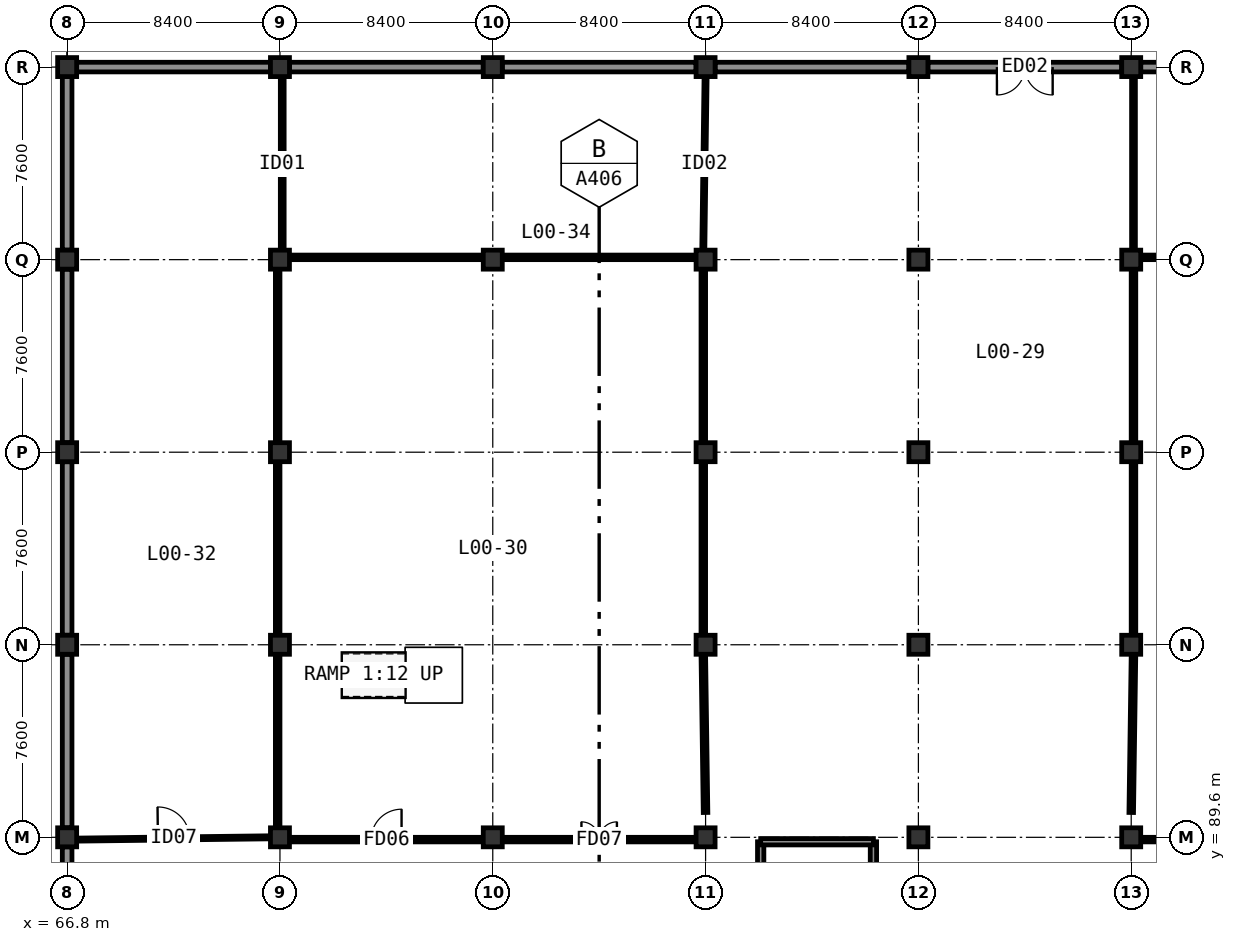
"""IFC4 building model, lengths in metres.
Left out: names, types, materials, properties, quantities, classifications, styles, units other than length and angle.
Written with IfcOpenShell. Run it as: python <this file> out.ifc"""

import sys

from ifc_helpers import new_model, si_unit, direction, frame, frame_2d, origin, origin_2d, place, context, subcontext, project, spatial, rectangle, extrude, element, fill, save


model = new_model("IFC4")
c1 = context("Model", 3, precision=1e-05, world=origin(), true_north=direction((0.0, 1.0)))
c2 = subcontext(c1, "Body", "Model", "MODEL_VIEW")
j1 = project(units=[si_unit("LENGTHUNIT", "METRE"), si_unit("PLANEANGLEUNIT", "RADIAN")], contexts=[c1])
p1 = place(None, origin())
s1 = spatial("IfcSite", under=j1, at=p1, CompositionType="ELEMENT")
p2 = place(p1, origin())
s2 = spatial("IfcBuilding", under=s1, at=p2, CompositionType="ELEMENT")
p3 = place(p2, origin())
s3 = spatial("IfcBuildingStorey", under=s2, at=p3, CompositionType="ELEMENT", Elevation=0.0)
for number, where, z_axis, x_axis in (
    (1, (66.8, 89.6, 0.0), (0.0, 0.0, 1.0), (1.0, 0.0, 0.0)),
    (2, (75.2, 89.6, 0.0), (0.0, 0.0, 1.0), (1.0, 0.0, 0.0)),
    (3, (83.6, 89.6, 0.0), (0.0, 0.0, 1.0), (1.0, 0.0, 0.0)),
    (4, (92.0, 89.6, 0.0), (0.0, 0.0, 1.0), (1.0, 0.0, 0.0)),
    (5, (100.4, 89.6, 0.0), (0.0, 0.0, 1.0), (1.0, 0.0, 0.0)),
    (6, (108.8, 89.6, 0.0), (0.0, 0.0, 1.0), (1.0, 0.0, 0.0)),
    (7, (66.8, 97.2, 0.0), (0.0, 0.0, 1.0), (1.0, 0.0, 0.0)),
    (8, (75.2, 97.2, 0.0), (0.0, 0.0, 1.0), (1.0, 0.0, 0.0)),
    (9, (92.0, 97.2, 0.0), (0.0, 0.0, 1.0), (1.0, 0.0, 0.0)),
    (10, (100.4, 97.2, 0.0), (0.0, 0.0, 1.0), (1.0, 0.0, 0.0)),
    (11, (108.8, 97.2, 0.0), (0.0, 0.0, 1.0), (1.0, 0.0, 0.0)),
    (12, (66.8, 104.8, 0.0), (0.0, 0.0, 1.0), (1.0, 0.0, 0.0)),
    (13, (75.2, 104.8, 0.0), (0.0, 0.0, 1.0), (1.0, 0.0, 0.0)),
    (14, (92.0, 104.8, 0.0), (0.0, 0.0, 1.0), (1.0, 0.0, 0.0)),
    (15, (100.4, 104.8, 0.0), (0.0, 0.0, 1.0), (1.0, 0.0, 0.0)),
    (16, (108.8, 104.8, 0.0), (0.0, 0.0, 1.0), (1.0, 0.0, 0.0)),
    (17, (66.8, 112.4, 0.0), (0.0, 0.0, 1.0), (1.0, 0.0, 0.0)),
    (18, (75.2, 112.4, 0.0), (0.0, 0.0, 1.0), (1.0, 0.0, 0.0)),
    (19, (83.6, 112.4, 0.0), (0.0, 0.0, 1.0), (1.0, 0.0, 0.0)),
    (20, (92.0, 112.4, 0.0), (0.0, 0.0, 1.0), (1.0, 0.0, 0.0)),
    (21, (100.4, 112.4, 0.0), (0.0, 0.0, 1.0), (1.0, 0.0, 0.0)),
    (22, (108.8, 112.4, 0.0), (0.0, 0.0, 1.0), (1.0, 0.0, 0.0)),
    (23, (66.8, 120.0, 0.0), (0.0, 0.0, 1.0), (1.0, 0.0, 0.0)),
    (24, (75.2, 120.0, 0.0), (0.0, 0.0, 1.0), (1.0, 0.0, 0.0)),
    (25, (83.6, 120.0, 0.0), (0.0, 0.0, 1.0), (1.0, 0.0, 0.0)),
    (26, (92.0, 120.0, 0.0), (0.0, 0.0, 1.0), (1.0, 0.0, 0.0)),
    (27, (100.4, 120.0, 0.0), (0.0, 0.0, 1.0), (1.0, 0.0, 0.0)),
    (28, (108.8, 120.0, 0.0), (0.0, 0.0, 1.0), (1.0, 0.0, 0.0)),
):
    element("IfcColumn", number, at=place(p3, frame(where, z_axis=z_axis, x_axis=x_axis)), inside=s3, PredefinedType="COLUMN", context=c2, shape_type="SweptSolid", body=[
        extrude(rectangle(XDim=0.75, YDim=0.75, at=origin_2d()), origin(), (0.0, 0.0, 1.0), 4.8),
    ])
p4 = place(p3, frame((116.825, 120.0, 0.0), z_axis=(0.0, 0.0, 1.0), x_axis=(-1.0, 0.0, 0.0)))
e29 = element("IfcWall", 29, at=p4, inside=s3, PredefinedType="SOLIDWALL", context=c2, shape_type="SweptSolid", body=[
    extrude(rectangle(XDim=7.65, YDim=0.38, at=frame_2d((3.825, 0.0))), origin(), (0.0, 0.0, 1.0), 4.187),
])
p5 = place(p3, frame((108.425, 120.0, 0.0), z_axis=(0.0, 0.0, 1.0), x_axis=(-1.0, 0.0, 0.0)))
e30 = element("IfcWall", 30, at=p5, inside=s3, PredefinedType="SOLIDWALL", context=c2, shape_type="SweptSolid", body=[
    extrude(rectangle(XDim=7.65, YDim=0.38, at=frame_2d((3.825, 0.0))), origin(), (0.0, 0.0, 1.0), 4.187),
])
p6 = place(p5, frame((2.725, 0.0, 0.0)))
e31 = element("IfcOpeningElement", 31, at=p6, cuts=e30, PredefinedType="OPENING", context=c2, shape_type="SweptSolid", body=[
    extrude(rectangle(XDim=2.2, YDim=2.4, at=frame_2d((1.1, 1.2))), frame((0.0, 0.2, 0.0), z_axis=(0.0, -1.0, 0.0), x_axis=(1.0, 0.0, 0.0)), (0.0, 0.0, 1.0), 0.4),
])
for number, where, z_axis, x_axis in (
    (32, (100.025, 120.0, 0.0), (0.0, 0.0, 1.0), (-1.0, 0.0, 0.0)),
    (33, (91.625, 120.0, 0.0), (0.0, 0.0, 1.0), (-1.0, 0.0, 0.0)),
):
    element("IfcWall", number, at=place(p3, frame(where, z_axis=z_axis, x_axis=x_axis)), inside=s3, PredefinedType="SOLIDWALL", context=c2, shape_type="SweptSolid", body=[
        extrude(rectangle(XDim=7.65, YDim=0.38, at=frame_2d((3.825, 0.0))), origin(), (0.0, 0.0, 1.0), 4.187),
    ])
p7 = place(p3, frame((83.225, 120.0, 0.0), z_axis=(0.0, 0.0, 1.0), x_axis=(-1.0, 0.0, 0.0)))
e34 = element("IfcWall", 34, at=p7, inside=s3, PredefinedType="SOLIDWALL", context=c2, shape_type="SweptSolid", body=[
    extrude(rectangle(XDim=7.65, YDim=0.38, at=frame_2d((3.825, 0.0))), origin(), (0.0, 0.0, 1.0), 4.187),
])
p8 = place(p3, frame((74.825, 120.0, 0.0), z_axis=(0.0, 0.0, 1.0), x_axis=(-1.0, 0.0, 0.0)))
e35 = element("IfcWall", 35, at=p8, inside=s3, PredefinedType="SOLIDWALL", context=c2, shape_type="SweptSolid", body=[
    extrude(rectangle(XDim=7.65, YDim=0.38, at=frame_2d((3.825, 0.0))), origin(), (0.0, 0.0, 1.0), 4.187),
])
p9 = place(p3, frame((66.8, 119.625, 0.0), z_axis=(0.0, 0.0, 1.0), x_axis=(0.0, -1.0, 0.0)))
e36 = element("IfcWall", 36, at=p9, inside=s3, PredefinedType="SOLIDWALL", context=c2, shape_type="SweptSolid", body=[
    extrude(rectangle(XDim=6.85, YDim=0.38, at=frame_2d((3.425, 0.0))), origin(), (0.0, 0.0, 1.0), 3.95),
])
p10 = place(p3, frame((66.8, 112.025, 0.0), z_axis=(0.0, 0.0, 1.0), x_axis=(0.0, -1.0, 0.0)))
e37 = element("IfcWall", 37, at=p10, inside=s3, PredefinedType="SOLIDWALL", context=c2, shape_type="SweptSolid", body=[
    extrude(rectangle(XDim=6.85, YDim=0.38, at=frame_2d((3.425, 0.0))), origin(), (0.0, 0.0, 1.0), 3.95),
])
p11 = place(p3, frame((66.8, 104.425, 0.0), z_axis=(0.0, 0.0, 1.0), x_axis=(0.0, -1.0, 0.0)))
e38 = element("IfcWall", 38, at=p11, inside=s3, PredefinedType="SOLIDWALL", context=c2, shape_type="SweptSolid", body=[
    extrude(rectangle(XDim=6.85, YDim=0.38, at=frame_2d((3.425, 0.0))), origin(), (0.0, 0.0, 1.0), 3.95),
])
p12 = place(p3, frame((66.8, 96.825, 0.0), z_axis=(0.0, 0.0, 1.0), x_axis=(0.0, -1.0, 0.0)))
e39 = element("IfcWall", 39, at=p12, inside=s3, PredefinedType="SOLIDWALL", context=c2, shape_type="SweptSolid", body=[
    extrude(rectangle(XDim=6.85, YDim=0.38, at=frame_2d((3.425, 0.0))), origin(), (0.0, 0.0, 1.0), 3.95),
])
p13 = place(p3, frame((66.8, 89.225, 0.0), z_axis=(0.0, 0.0, 1.0), x_axis=(0.0, -1.0, 0.0)))
e40 = element("IfcWall", 40, at=p13, inside=s3, PredefinedType="SOLIDWALL", context=c2, shape_type="SweptSolid", body=[
    extrude(rectangle(XDim=6.85, YDim=0.38, at=frame_2d((3.425, 0.0))), origin(), (0.0, 0.0, 1.0), 3.95),
])
p14 = place(p3, frame((94.175, 81.325, 0.0), z_axis=(0.0, 0.0, 1.0), x_axis=(0.0, 1.0, 0.0)))
e41 = element("IfcWall", 41, at=p14, inside=s3, PredefinedType="SHEAR", context=c2, shape_type="SweptSolid", body=[
    extrude(rectangle(XDim=8.1, YDim=0.25, at=frame_2d((4.05, 0.0))), origin(), (0.0, 0.0, 1.0), 4.52),
])
p15 = place(p3, frame((98.625, 81.325, 0.0), z_axis=(0.0, 0.0, 1.0), x_axis=(0.0, 1.0, 0.0)))
e42 = element("IfcWall", 42, at=p15, inside=s3, PredefinedType="SHEAR", context=c2, shape_type="SweptSolid", body=[
    extrude(rectangle(XDim=8.1, YDim=0.25, at=frame_2d((4.05, 0.0))), origin(), (0.0, 0.0, 1.0), 4.52),
])
p16 = place(p15, frame((1.15, 0.0, 0.0)))
e43 = element("IfcOpeningElement", 43, at=p16, cuts=e42, PredefinedType="OPENING", context=c2, shape_type="SweptSolid", body=[
    extrude(rectangle(XDim=1.05, YDim=2.1, at=frame_2d((0.525, 1.05))), frame((0.0, 0.135, 0.0), z_axis=(0.0, -1.0, 0.0), x_axis=(1.0, 0.0, 0.0)), (0.0, 0.0, 1.0), 0.27),
])
p17 = place(p3, frame((94.175, 89.425, 0.0), z_axis=(0.0, 0.0, 1.0), x_axis=(1.0, 0.0, 0.0)))
e44 = element("IfcWall", 44, at=p17, inside=s3, PredefinedType="SHEAR", context=c2, shape_type="SweptSolid", body=[
    extrude(rectangle(XDim=4.45, YDim=0.25, at=frame_2d((2.225, 0.0))), origin(), (0.0, 0.0, 1.0), 4.52),
])
p18 = place(p3, frame((67.28, 89.511, 0.0), z_axis=(0.0, 0.0, 1.0), x_axis=(0.999930126163, 0.01182128555, 0.0)))
e45 = element("IfcWall", 45, at=p18, inside=s3, PredefinedType="PARTITIONING", context=c2, shape_type="SweptSolid", body=[
    extrude(rectangle(XDim=7.456, YDim=0.12, at=frame_2d((3.728, 0.0))), origin(), (0.0, 0.0, 1.0), 3.95),
])
p19 = place(p18, frame((3.103, 0.0, 0.0)))
e46 = element("IfcOpeningElement", 46, at=p19, cuts=e45, PredefinedType="OPENING", context=c2, shape_type="SweptSolid", body=[
    extrude(rectangle(XDim=1.25, YDim=2.12, at=frame_2d((0.625, 1.06))), frame((0.0, 0.07, 0.0), z_axis=(0.0, -1.0, 0.0), x_axis=(1.0, 0.0, 0.0)), (0.0, 0.0, 1.0), 0.14),
])
p20 = place(p3, frame((75.665, 89.51, 0.0), z_axis=(0.0, 0.0, 1.0), x_axis=(1.0, 0.0, 0.0)))
e47 = element("IfcWall", 47, at=p20, inside=s3, PredefinedType="PARTITIONING", context=c2, shape_type="SweptSolid", body=[
    extrude(rectangle(XDim=7.47, YDim=0.18, at=frame_2d((3.735, 0.0))), origin(), (0.0, 0.0, 1.0), 4.187),
])
p21 = place(p20, frame((3.135, 0.0, 0.0)))
e48 = element("IfcOpeningElement", 48, at=p21, cuts=e47, PredefinedType="OPENING", context=c2, shape_type="SweptSolid", body=[
    extrude(rectangle(XDim=1.2, YDim=2.1, at=frame_2d((0.6, 1.05))), frame((0.0, 0.1, 0.0), z_axis=(0.0, -1.0, 0.0), x_axis=(1.0, 0.0, 0.0)), (0.0, 0.0, 1.0), 0.2),
])
p22 = place(p3, frame((84.065, 89.51, 0.0), z_axis=(0.0, 0.0, 1.0), x_axis=(1.0, 0.0, 0.0)))
e49 = element("IfcWall", 49, at=p22, inside=s3, PredefinedType="PARTITIONING", context=c2, shape_type="SweptSolid", body=[
    extrude(rectangle(XDim=7.47, YDim=0.18, at=frame_2d((3.735, 0.0))), origin(), (0.0, 0.0, 1.0), 4.187),
])
p23 = place(p22, frame((3.035, 0.0, 0.0)))
e50 = element("IfcOpeningElement", 50, at=p23, cuts=e49, PredefinedType="OPENING", context=c2, shape_type="SweptSolid", body=[
    extrude(rectangle(XDim=1.4, YDim=2.15, at=frame_2d((0.7, 1.075))), frame((0.0, 0.1, 0.0), z_axis=(0.0, -1.0, 0.0), x_axis=(1.0, 0.0, 0.0)), (0.0, 0.0, 1.0), 0.2),
])
p24 = place(p3, frame((109.265, 89.51, 0.0), z_axis=(0.0, 0.0, 1.0), x_axis=(1.0, 0.0, 0.0)))
e51 = element("IfcWall", 51, at=p24, inside=s3, PredefinedType="PARTITIONING", context=c2, shape_type="SweptSolid", body=[
    extrude(rectangle(XDim=7.47, YDim=0.18, at=frame_2d((3.735, 0.0))), origin(), (0.0, 0.0, 1.0), 4.187),
])
p25 = place(p24, frame((2.935, 0.0, 0.0)))
e52 = element("IfcOpeningElement", 52, at=p25, cuts=e51, PredefinedType="OPENING", context=c2, shape_type="SweptSolid", body=[
    extrude(rectangle(XDim=1.6, YDim=2.2, at=frame_2d((0.8, 1.1))), frame((0.0, 0.1, 0.0), z_axis=(0.0, -1.0, 0.0), x_axis=(1.0, 0.0, 0.0)), (0.0, 0.0, 1.0), 0.2),
])
p26 = place(p3, frame((75.29, 112.865, 0.0), z_axis=(0.0, 0.0, 1.0), x_axis=(0.0, 1.0, 0.0)))
e53 = element("IfcWall", 53, at=p26, inside=s3, PredefinedType="PARTITIONING", context=c2, shape_type="SweptSolid", body=[
    extrude(rectangle(XDim=6.655, YDim=0.15, at=frame_2d((3.328, 0.0))), origin(), (0.0, 0.0, 1.0), 3.95),
])
p27 = place(p26, frame((2.887, 0.0, 0.0)))
e54 = element("IfcOpeningElement", 54, at=p27, cuts=e53, PredefinedType="OPENING", context=c2, shape_type="SweptSolid", body=[
    extrude(rectangle(XDim=0.88, YDim=2.08, at=frame_2d((0.44, 1.04))), frame((0.0, 0.085, 0.0), z_axis=(0.0, -1.0, 0.0), x_axis=(1.0, 0.0, 0.0)), (0.0, 0.0, 1.0), 0.17),
])
for number, where, z_axis, x_axis in (
    (55, (83.135, 112.49, 0.0), (0.0, 0.0, 1.0), (-1.0, 0.0, 0.0)),
    (56, (91.535, 112.49, 0.0), (0.0, 0.0, 1.0), (-1.0, 0.0, 0.0)),
):
    element("IfcWall", number, at=place(p3, frame(where, z_axis=z_axis, x_axis=x_axis)), inside=s3, PredefinedType="PARTITIONING", context=c2, shape_type="SweptSolid", body=[
        extrude(rectangle(XDim=7.47, YDim=0.18, at=frame_2d((3.735, 0.0))), origin(), (0.0, 0.0, 1.0), 4.187),
    ])
p28 = place(p3, frame((91.999, 119.52, 0.0), z_axis=(0.0, 0.0, 1.0), x_axis=(-0.013168820212, -0.999913287328, 0.0)))
e57 = element("IfcWall", 57, at=p28, inside=s3, PredefinedType="PARTITIONING", context=c2, shape_type="SweptSolid", body=[
    extrude(rectangle(XDim=6.656, YDim=0.12, at=frame_2d((3.328, 0.0))), origin(), (0.0, 0.0, 1.0), 3.95),
])
p29 = place(p28, frame((2.868, 0.0, 0.0)))
e58 = element("IfcOpeningElement", 58, at=p29, cuts=e57, PredefinedType="OPENING", context=c2, shape_type="SweptSolid", body=[
    extrude(rectangle(XDim=0.92, YDim=2.08, at=frame_2d((0.46, 1.04))), frame((0.0, 0.07, 0.0), z_axis=(0.0, -1.0, 0.0), x_axis=(1.0, 0.0, 0.0)), (0.0, 0.0, 1.0), 0.14),
])
p30 = place(p3, frame((116.735, 112.49, 0.0), z_axis=(0.0, 0.0, 1.0), x_axis=(-1.0, 0.0, 0.0)))
e59 = element("IfcWall", 59, at=p30, inside=s3, PredefinedType="PARTITIONING", context=c2, shape_type="SweptSolid", body=[
    extrude(rectangle(XDim=7.47, YDim=0.18, at=frame_2d((3.735, 0.0))), origin(), (0.0, 0.0, 1.0), 4.187),
])
p31 = place(p3, frame((108.89, 112.865, 0.0), z_axis=(0.0, 0.0, 1.0), x_axis=(0.0, 1.0, 0.0)))
e60 = element("IfcWall", 60, at=p31, inside=s3, PredefinedType="PARTITIONING", context=c2, shape_type="SweptSolid", body=[
    extrude(rectangle(XDim=6.655, YDim=0.15, at=frame_2d((3.328, 0.0))), origin(), (0.0, 0.0, 1.0), 3.95),
])
p32 = place(p3, frame((75.11, 104.335, 0.0), z_axis=(0.0, 0.0, 1.0), x_axis=(0.0, -1.0, 0.0)))
e61 = element("IfcWall", 61, at=p32, inside=s3, PredefinedType="PARTITIONING", context=c2, shape_type="SweptSolid", body=[
    extrude(rectangle(XDim=6.67, YDim=0.18, at=frame_2d((3.335, 0.0))), origin(), (0.0, 0.0, 1.0), 3.95),
])
for number, where, z_axis, x_axis in (
    (62, (75.11, 111.935, 0.0), (0.0, 0.0, 1.0), (0.0, -1.0, 0.0)),
    (63, (75.11, 96.735, 0.0), (0.0, 0.0, 1.0), (0.0, -1.0, 0.0)),
):
    element("IfcWall", number, at=place(p3, frame(where, z_axis=z_axis, x_axis=x_axis)), inside=s3, PredefinedType="PARTITIONING", context=c2, shape_type="SweptSolid", body=[
        extrude(rectangle(XDim=6.67, YDim=0.18, at=frame_2d((3.335, 0.0))), origin(), (0.0, 0.0, 1.0), 3.95),
    ])
p33 = place(p3, frame((91.91, 104.335, 0.0), z_axis=(0.0, 0.0, 1.0), x_axis=(0.0, -1.0, 0.0)))
e64 = element("IfcWall", 64, at=p33, inside=s3, PredefinedType="PARTITIONING", context=c2, shape_type="SweptSolid", body=[
    extrude(rectangle(XDim=6.67, YDim=0.18, at=frame_2d((3.335, 0.0))), origin(), (0.0, 0.0, 1.0), 3.95),
])
p34 = place(p3, frame((91.91, 111.935, 0.0), z_axis=(0.0, 0.0, 1.0), x_axis=(0.0, -1.0, 0.0)))
e65 = element("IfcWall", 65, at=p34, inside=s3, PredefinedType="PARTITIONING", context=c2, shape_type="SweptSolid", body=[
    extrude(rectangle(XDim=6.67, YDim=0.18, at=frame_2d((3.335, 0.0))), origin(), (0.0, 0.0, 1.0), 3.95),
])
p35 = place(p3, frame((91.911, 96.735, 0.0), z_axis=(0.0, 0.0, 1.0), x_axis=(0.014239501849, -0.999898613154, 0.0)))
e66 = element("IfcWall", 66, at=p35, inside=s3, PredefinedType="PARTITIONING", context=c2, shape_type="SweptSolid", body=[
    extrude(rectangle(XDim=6.155, YDim=0.18, at=frame_2d((3.078, 0.0))), origin(), (0.0, 0.0, 1.0), 3.95),
])
p36 = place(p3, frame((108.89, 97.665, 0.0), z_axis=(0.0, 0.0, 1.0), x_axis=(0.0, 1.0, 0.0)))
e67 = element("IfcWall", 67, at=p36, inside=s3, PredefinedType="PARTITIONING", context=c2, shape_type="SweptSolid", body=[
    extrude(rectangle(XDim=6.67, YDim=0.18, at=frame_2d((3.335, 0.0))), origin(), (0.0, 0.0, 1.0), 3.95),
])
p37 = place(p3, frame((108.89, 105.265, 0.0), z_axis=(0.0, 0.0, 1.0), x_axis=(0.0, 1.0, 0.0)))
e68 = element("IfcWall", 68, at=p37, inside=s3, PredefinedType="PARTITIONING", context=c2, shape_type="SweptSolid", body=[
    extrude(rectangle(XDim=6.67, YDim=0.18, at=frame_2d((3.335, 0.0))), origin(), (0.0, 0.0, 1.0), 3.95),
])
p38 = place(p3, frame((108.801, 90.581, 0.0), z_axis=(0.0, 0.0, 1.0), x_axis=(0.014279158124, 0.999898047624, 0.0)))
e69 = element("IfcWall", 69, at=p38, inside=s3, PredefinedType="PARTITIONING", context=c2, shape_type="SweptSolid", body=[
    extrude(rectangle(XDim=6.155, YDim=0.18, at=frame_2d((3.078, 0.0))), origin(), (0.0, 0.0, 1.0), 3.95),
])
p39 = place(p6, frame((2.2, 0.0, 0.0), z_axis=(0.0, 0.0, 1.0), x_axis=(-1.0, 0.0, 0.0)))
e70 = element("IfcDoor", 70, at=p39, inside=s3, OperationType="DOUBLE_DOOR_SINGLE_SWING", PredefinedType="DOOR", context=c2, shape_type="SweptSolid", body=[
    extrude(rectangle(XDim=2.2, YDim=2.4, at=frame_2d((1.1, 1.2))), frame((0.0, 0.025, 0.0), z_axis=(0.0, -1.0, 0.0), x_axis=(1.0, 0.0, 0.0)), (0.0, 0.0, 1.0), 0.05),
])
fill(e31, e70)
p40 = place(p19, origin())
e71 = element("IfcDoor", 71, at=p40, inside=s3, OperationType="SINGLE_SWING_LEFT", PredefinedType="DOOR", context=c2, shape_type="SweptSolid", body=[
    extrude(rectangle(XDim=1.25, YDim=2.12, at=frame_2d((0.625, 1.06))), frame((0.0, 0.025, 0.0), z_axis=(0.0, -1.0, 0.0), x_axis=(1.0, 0.0, 0.0)), (0.0, 0.0, 1.0), 0.05),
])
fill(e46, e71)
p41 = place(p21, origin())
e72 = element("IfcDoor", 72, at=p41, inside=s3, OperationType="SINGLE_SWING_RIGHT", PredefinedType="DOOR", context=c2, shape_type="SweptSolid", body=[
    extrude(rectangle(XDim=1.2, YDim=2.1, at=frame_2d((0.6, 1.05))), frame((0.0, 0.025, 0.0), z_axis=(0.0, -1.0, 0.0), x_axis=(1.0, 0.0, 0.0)), (0.0, 0.0, 1.0), 0.05),
])
fill(e48, e72)
p42 = place(p23, origin())
e73 = element("IfcDoor", 73, at=p42, inside=s3, OperationType="DOUBLE_DOOR_SINGLE_SWING", PredefinedType="DOOR", context=c2, shape_type="SweptSolid", body=[
    extrude(rectangle(XDim=1.4, YDim=2.15, at=frame_2d((0.7, 1.075))), frame((0.0, 0.025, 0.0), z_axis=(0.0, -1.0, 0.0), x_axis=(1.0, 0.0, 0.0)), (0.0, 0.0, 1.0), 0.05),
])
fill(e50, e73)
p43 = place(p27, origin())
e74 = element("IfcDoor", 74, at=p43, inside=s3, OperationType="SINGLE_SWING_LEFT", PredefinedType="DOOR", context=c2, shape_type="SweptSolid", body=[
    extrude(rectangle(XDim=0.88, YDim=2.08, at=frame_2d((0.44, 1.04))), frame((0.0, 0.025, 0.0), z_axis=(0.0, -1.0, 0.0), x_axis=(1.0, 0.0, 0.0)), (0.0, 0.0, 1.0), 0.05),
])
fill(e54, e74)
p44 = place(p29, origin())
e75 = element("IfcDoor", 75, at=p44, inside=s3, OperationType="SINGLE_SWING_RIGHT", PredefinedType="DOOR", context=c2, shape_type="SweptSolid", body=[
    extrude(rectangle(XDim=0.92, YDim=2.08, at=frame_2d((0.46, 1.04))), frame((0.0, 0.025, 0.0), z_axis=(0.0, -1.0, 0.0), x_axis=(1.0, 0.0, 0.0)), (0.0, 0.0, 1.0), 0.05),
])
fill(e58, e75)
save(model, sys.argv[1])
